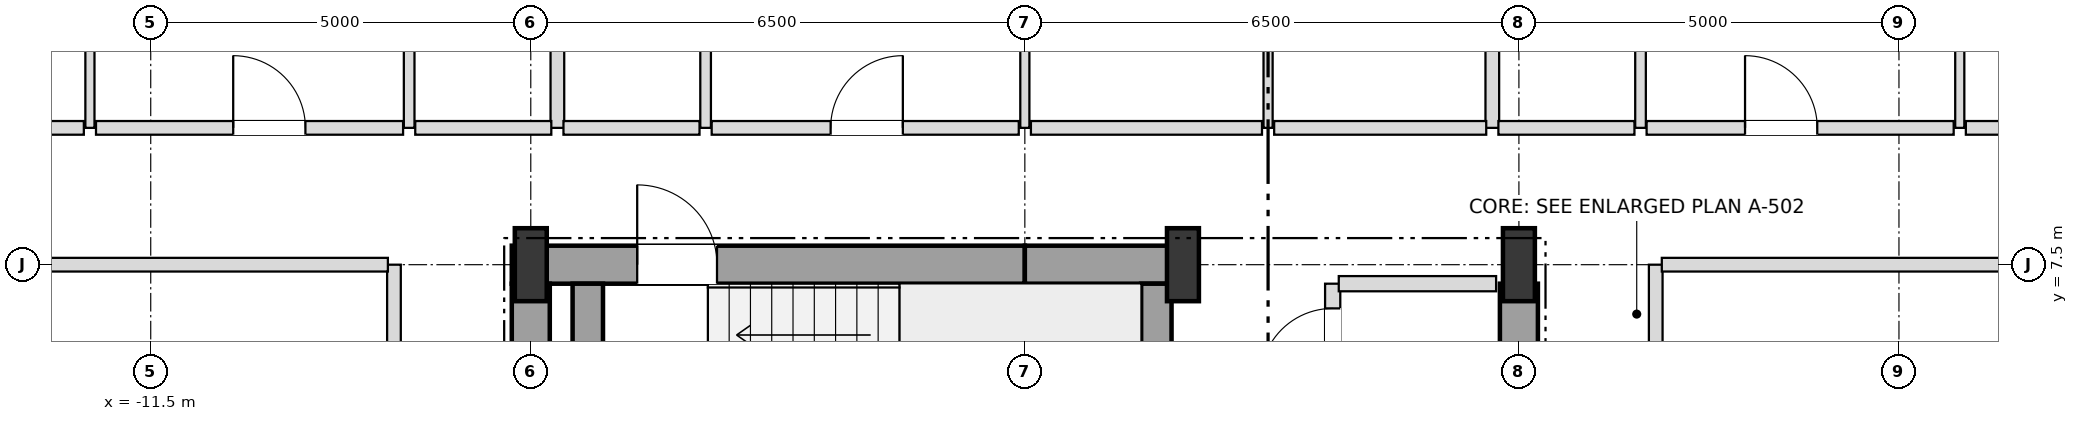
"""IFC4 building model, lengths in metres.
Left out: names, types, materials, properties, quantities, classifications, styles, units other than length and angle.
Written with IfcOpenShell. Run it as: python <this file> out.ifc"""

import sys

from ifc_helpers import new_model, si_unit, direction, frame, frame_2d, origin, origin_2d, place, context, subcontext, project, spatial, rectangle, i_section, extrude, element, fill, save


model = new_model("IFC4")
c1 = context("Model", 3, precision=1e-05, world=origin(), true_north=direction((0.0, 1.0)))
c2 = subcontext(c1, "Body", "Model", "MODEL_VIEW")
j1 = project(units=[si_unit("LENGTHUNIT", "METRE"), si_unit("PLANEANGLEUNIT", "RADIAN")], contexts=[c1])
p1 = place(None, origin())
s1 = spatial("IfcSite", under=j1, at=p1, CompositionType="ELEMENT")
p2 = place(p1, origin())
s2 = spatial("IfcBuilding", under=s1, at=p2, CompositionType="ELEMENT")
p3 = place(p2, frame((0.0, 0.0, 39.6)))
s3 = spatial("IfcBuildingStorey", under=s2, at=p3, CompositionType="ELEMENT", Elevation=39.6)
for number, where, z_axis, x_axis in (
    (1, (-6.5, 7.5, 0.0), (0.0, 0.0, 1.0), (1.0, 0.0, 0.0)),
    (2, (2.08, 7.5, 0.0), (0.0, 0.0, 1.0), (1.0, 0.0, 0.0)),
    (3, (6.5, 7.5, 0.0), (0.0, 0.0, 1.0), (1.0, 0.0, 0.0)),
):
    element("IfcColumn", number, at=place(p3, frame(where, z_axis=z_axis, x_axis=x_axis)), inside=s3, PredefinedType="COLUMN", context=c2, shape_type="SweptSolid", body=[
        extrude(i_section(OverallWidth=0.42, OverallDepth=0.96, WebThickness=0.022, FlangeThickness=0.034, at=origin_2d()), origin(), (0.0, 0.0, 1.0), 3.6),
    ])
p4 = place(p3, frame((-6.75, 7.5, 0.0), z_axis=(0.0, 0.0, 1.0), x_axis=(1.0, 0.0, 0.0)))
e4 = element("IfcWall", 4, at=p4, inside=s3, PredefinedType="SHEAR", context=c2, shape_type="SweptSolid", body=[
    extrude(rectangle(XDim=6.75, YDim=0.5, at=frame_2d((3.375, 0.0))), origin(), (0.0, 0.0, 1.0), 3.38),
])
p5 = place(p4, frame((1.65, 0.0, 0.0)))
e5 = element("IfcOpeningElement", 5, at=p5, cuts=e4, PredefinedType="OPENING", context=c2, shape_type="SweptSolid", body=[
    extrude(rectangle(XDim=1.05, YDim=2.15, at=frame_2d((0.525, 1.075))), frame((0.0, 0.26, 0.0), z_axis=(0.0, -1.0, 0.0), x_axis=(1.0, 0.0, 0.0)), (0.0, 0.0, 1.0), 0.52),
])
p6 = place(p3, frame((0.0, 7.5, 0.0), z_axis=(0.0, 0.0, 1.0), x_axis=(1.0, 0.0, 0.0)))
e6 = element("IfcWall", 6, at=p6, inside=s3, PredefinedType="SHEAR", context=c2, shape_type="SweptSolid", body=[
    extrude(rectangle(XDim=2.08, YDim=0.5, at=frame_2d((1.04, 0.0))), origin(), (0.0, 0.0, 1.0), 3.38),
])
for number, where, z_axis, x_axis in (
    (7, (-6.5, 3.95, 0.0), (0.0, 0.0, 1.0), (0.0, 1.0, 0.0)),
    (8, (6.5, 3.95, 0.0), (0.0, 0.0, 1.0), (0.0, 1.0, 0.0)),
):
    element("IfcWall", number, at=place(p3, frame(where, z_axis=z_axis, x_axis=x_axis)), inside=s3, PredefinedType="SHEAR", context=c2, shape_type="SweptSolid", body=[
        extrude(rectangle(XDim=3.3, YDim=0.5, at=frame_2d((1.65, 0.0))), origin(), (0.0, 0.0, 1.0), 3.38),
    ])
for number, where, z_axis, x_axis in (
    (9, (1.73, 3.95, 0.0), (0.0, 0.0, 1.0), (0.0, 1.0, 0.0)),
    (10, (-5.75, 3.95, 0.0), (0.0, 0.0, 1.0), (0.0, 1.0, 0.0)),
):
    element("IfcWall", number, at=place(p3, frame(where, z_axis=z_axis, x_axis=x_axis)), inside=s3, PredefinedType="SHEAR", context=c2, shape_type="SweptSolid", body=[
        extrude(rectangle(XDim=3.3, YDim=0.4, at=frame_2d((1.65, 0.0))), origin(), (0.0, 0.0, 1.0), 3.38),
    ])
p7 = place(p3, frame((-12.3, 9.3, 0.0), z_axis=(0.0, 0.0, 1.0), x_axis=(0.0, 1.0, 0.0)))
e11 = element("IfcWall", 11, at=p7, inside=s3, PredefinedType="PARTITIONING", context=c2, shape_type="SweptSolid", body=[
    extrude(rectangle(XDim=15.6, YDim=0.12, at=frame_2d((7.8, 0.0))), origin(), (0.0, 0.0, 1.0), 2.736),
])
p8 = place(p7, frame((4.325, 0.0, 0.0)))
e12 = element("IfcOpeningElement", 12, at=p8, cuts=e11, PredefinedType="OPENING", context=c2, shape_type="SweptSolid", body=[
    extrude(rectangle(XDim=0.95, YDim=2.1, at=frame_2d((0.475, 1.05))), frame((0.0, 0.07, 0.0), z_axis=(0.0, -1.0, 0.0), x_axis=(1.0, 0.0, 0.0)), (0.0, 0.0, 1.0), 0.14),
])
p9 = place(p7, frame((12.15, 0.0, 0.0)))
e13 = element("IfcOpeningElement", 13, at=p9, cuts=e11, PredefinedType="OPENING", context=c2, shape_type="SweptSolid", body=[
    extrude(rectangle(XDim=0.9, YDim=2.1, at=frame_2d((0.45, 1.05))), frame((0.0, 0.07, 0.0), z_axis=(0.0, -1.0, 0.0), x_axis=(1.0, 0.0, 0.0)), (0.0, 0.0, 1.0), 0.14),
])
p10 = place(p3, frame((-8.3, -7.5, 0.0), z_axis=(0.0, 0.0, 1.0), x_axis=(0.0, 1.0, 0.0)))
e14 = element("IfcWall", 14, at=p10, inside=s3, PredefinedType="PARTITIONING", context=c2, shape_type="SweptSolid", body=[
    extrude(rectangle(XDim=15.0, YDim=0.18, at=frame_2d((7.5, 0.0))), origin(), (0.0, 0.0, 1.0), 3.38),
])
p11 = place(p10, frame((3.475, 0.0, 0.0)))
e15 = element("IfcOpeningElement", 15, at=p11, cuts=e14, PredefinedType="OPENING", context=c2, shape_type="SweptSolid", body=[
    extrude(rectangle(XDim=0.95, YDim=2.15, at=frame_2d((0.475, 1.075))), frame((0.0, 0.1, 0.0), z_axis=(0.0, -1.0, 0.0), x_axis=(1.0, 0.0, 0.0)), (0.0, 0.0, 1.0), 0.2),
])
p12 = place(p3, frame((-8.1, 9.3, 0.0), z_axis=(0.0, 0.0, 1.0), x_axis=(0.0, 1.0, 0.0)))
e16 = element("IfcWall", 16, at=p12, inside=s3, PredefinedType="PARTITIONING", context=c2, shape_type="SweptSolid", body=[
    extrude(rectangle(XDim=9.6, YDim=0.14, at=frame_2d((4.8, 0.0))), origin(), (0.0, 0.0, 1.0), 2.816),
])
p13 = place(p12, frame((4.35, 0.0, 0.0)))
e17 = element("IfcOpeningElement", 17, at=p13, cuts=e16, PredefinedType="OPENING", context=c2, shape_type="SweptSolid", body=[
    extrude(rectangle(XDim=0.9, YDim=2.1, at=frame_2d((0.45, 1.05))), frame((0.0, 0.08, 0.0), z_axis=(0.0, -1.0, 0.0), x_axis=(1.0, 0.0, 0.0)), (0.0, 0.0, 1.0), 0.16),
])
p14 = place(p3, frame((-6.15, 9.3, 0.0), z_axis=(0.0, 0.0, 1.0), x_axis=(0.0, 1.0, 0.0)))
e18 = element("IfcWall", 18, at=p14, inside=s3, PredefinedType="PARTITIONING", context=c2, shape_type="SweptSolid", body=[
    extrude(rectangle(XDim=15.6, YDim=0.18, at=frame_2d((7.8, 0.0))), origin(), (0.0, 0.0, 1.0), 2.816),
])
p15 = place(p3, frame((-4.2, 9.3, 0.0), z_axis=(0.0, 0.0, 1.0), x_axis=(0.0, 1.0, 0.0)))
e19 = element("IfcWall", 19, at=p15, inside=s3, PredefinedType="PARTITIONING", context=c2, shape_type="SweptSolid", body=[
    extrude(rectangle(XDim=9.6, YDim=0.14, at=frame_2d((4.8, 0.0))), origin(), (0.0, 0.0, 1.0), 2.948),
])
p16 = place(p15, frame((4.35, 0.0, 0.0)))
e20 = element("IfcOpeningElement", 20, at=p16, cuts=e19, PredefinedType="OPENING", context=c2, shape_type="SweptSolid", body=[
    extrude(rectangle(XDim=0.9, YDim=2.1, at=frame_2d((0.45, 1.05))), frame((0.0, 0.08, 0.0), z_axis=(0.0, -1.0, 0.0), x_axis=(1.0, 0.0, 0.0)), (0.0, 0.0, 1.0), 0.16),
])
p17 = place(p3, frame((0.0, 9.3, 0.0), z_axis=(0.0, 0.0, 1.0), x_axis=(0.0, 1.0, 0.0)))
e21 = element("IfcWall", 21, at=p17, inside=s3, PredefinedType="PARTITIONING", context=c2, shape_type="SweptSolid", body=[
    extrude(rectangle(XDim=15.6, YDim=0.12, at=frame_2d((7.8, 0.0))), origin(), (0.0, 0.0, 1.0), 2.816),
])
p18 = place(p17, frame((4.325, 0.0, 0.0)))
e22 = element("IfcOpeningElement", 22, at=p18, cuts=e21, PredefinedType="OPENING", context=c2, shape_type="SweptSolid", body=[
    extrude(rectangle(XDim=0.95, YDim=2.1, at=frame_2d((0.475, 1.05))), frame((0.0, 0.07, 0.0), z_axis=(0.0, -1.0, 0.0), x_axis=(1.0, 0.0, 0.0)), (0.0, 0.0, 1.0), 0.14),
])
p19 = place(p17, frame((12.15, 0.0, 0.0)))
e23 = element("IfcOpeningElement", 23, at=p19, cuts=e21, PredefinedType="OPENING", context=c2, shape_type="SweptSolid", body=[
    extrude(rectangle(XDim=0.9, YDim=2.1, at=frame_2d((0.45, 1.05))), frame((0.0, 0.07, 0.0), z_axis=(0.0, -1.0, 0.0), x_axis=(1.0, 0.0, 0.0)), (0.0, 0.0, 1.0), 0.14),
])
p20 = place(p3, frame((3.2, 9.3, 0.0), z_axis=(0.0, 0.0, 1.0), x_axis=(0.0, 1.0, 0.0)))
e24 = element("IfcWall", 24, at=p20, inside=s3, PredefinedType="PARTITIONING", context=c2, shape_type="SweptSolid", body=[
    extrude(rectangle(XDim=15.6, YDim=0.12, at=frame_2d((7.8, 0.0))), origin(), (0.0, 0.0, 1.0), 2.816),
])
p21 = place(p20, frame((4.35, 0.0, 0.0)))
e25 = element("IfcOpeningElement", 25, at=p21, cuts=e24, PredefinedType="OPENING", context=c2, shape_type="SweptSolid", body=[
    extrude(rectangle(XDim=0.9, YDim=2.1, at=frame_2d((0.45, 1.05))), frame((0.0, 0.07, 0.0), z_axis=(0.0, -1.0, 0.0), x_axis=(1.0, 0.0, 0.0)), (0.0, 0.0, 1.0), 0.14),
])
p22 = place(p20, frame((12.15, 0.0, 0.0)))
e26 = element("IfcOpeningElement", 26, at=p22, cuts=e24, PredefinedType="OPENING", context=c2, shape_type="SweptSolid", body=[
    extrude(rectangle(XDim=0.9, YDim=2.1, at=frame_2d((0.45, 1.05))), frame((0.0, 0.07, 0.0), z_axis=(0.0, -1.0, 0.0), x_axis=(1.0, 0.0, 0.0)), (0.0, 0.0, 1.0), 0.14),
])
p23 = place(p3, frame((4.05, 4.2, 0.0), z_axis=(0.0, 0.0, 1.0), x_axis=(0.0, 1.0, 0.0)))
e27 = element("IfcWall", 27, at=p23, inside=s3, PredefinedType="SOLIDWALL", context=c2, shape_type="SweptSolid", body=[
    extrude(rectangle(XDim=3.05, YDim=0.2, at=frame_2d((1.525, 0.0))), origin(), (0.0, 0.0, 1.0), 3.38),
])
p24 = place(p23, frame((0.275, 0.0, 0.0)))
e28 = element("IfcOpeningElement", 28, at=p24, cuts=e27, PredefinedType="OPENING", context=c2, shape_type="SweptSolid", body=[
    extrude(rectangle(XDim=0.95, YDim=2.15, at=frame_2d((0.475, 1.075))), frame((0.0, 0.11, 0.0), z_axis=(0.0, -1.0, 0.0), x_axis=(1.0, 0.0, 0.0)), (0.0, 0.0, 1.0), 0.22),
])
p25 = place(p23, frame((1.775, 0.0, 0.0)))
e29 = element("IfcOpeningElement", 29, at=p25, cuts=e27, PredefinedType="OPENING", context=c2, shape_type="SweptSolid", body=[
    extrude(rectangle(XDim=0.95, YDim=2.15, at=frame_2d((0.475, 1.075))), frame((0.0, 0.11, 0.0), z_axis=(0.0, -1.0, 0.0), x_axis=(1.0, 0.0, 0.0)), (0.0, 0.0, 1.0), 0.22),
])
p26 = place(p3, frame((6.15, 9.3, 0.0), z_axis=(0.0, 0.0, 1.0), x_axis=(0.0, 1.0, 0.0)))
e30 = element("IfcWall", 30, at=p26, inside=s3, PredefinedType="PARTITIONING", context=c2, shape_type="SweptSolid", body=[
    extrude(rectangle(XDim=15.6, YDim=0.18, at=frame_2d((7.8, 0.0))), origin(), (0.0, 0.0, 1.0), 2.816),
])
p27 = place(p3, frame((8.1, 9.3, 0.0), z_axis=(0.0, 0.0, 1.0), x_axis=(0.0, 1.0, 0.0)))
e31 = element("IfcWall", 31, at=p27, inside=s3, PredefinedType="PARTITIONING", context=c2, shape_type="SweptSolid", body=[
    extrude(rectangle(XDim=9.6, YDim=0.14, at=frame_2d((4.8, 0.0))), origin(), (0.0, 0.0, 1.0), 2.816),
])
p28 = place(p27, frame((4.35, 0.0, 0.0)))
e32 = element("IfcOpeningElement", 32, at=p28, cuts=e31, PredefinedType="OPENING", context=c2, shape_type="SweptSolid", body=[
    extrude(rectangle(XDim=0.9, YDim=2.1, at=frame_2d((0.45, 1.05))), frame((0.0, 0.08, 0.0), z_axis=(0.0, -1.0, 0.0), x_axis=(1.0, 0.0, 0.0)), (0.0, 0.0, 1.0), 0.16),
])
p29 = place(p3, frame((8.3, -7.5, 0.0), z_axis=(0.0, 0.0, 1.0), x_axis=(0.0, 1.0, 0.0)))
e33 = element("IfcWall", 33, at=p29, inside=s3, PredefinedType="PARTITIONING", context=c2, shape_type="SweptSolid", body=[
    extrude(rectangle(XDim=15.0, YDim=0.18, at=frame_2d((7.5, 0.0))), origin(), (0.0, 0.0, 1.0), 3.38),
])
p30 = place(p29, frame((3.475, 0.0, 0.0)))
e34 = element("IfcOpeningElement", 34, at=p30, cuts=e33, PredefinedType="OPENING", context=c2, shape_type="SweptSolid", body=[
    extrude(rectangle(XDim=0.95, YDim=2.15, at=frame_2d((0.475, 1.075))), frame((0.0, 0.1, 0.0), z_axis=(0.0, -1.0, 0.0), x_axis=(1.0, 0.0, 0.0)), (0.0, 0.0, 1.0), 0.2),
])
p31 = place(p3, frame((12.3, 9.3, 0.0), z_axis=(0.0, 0.0, 1.0), x_axis=(0.0, 1.0, 0.0)))
e35 = element("IfcWall", 35, at=p31, inside=s3, PredefinedType="PARTITIONING", context=c2, shape_type="SweptSolid", body=[
    extrude(rectangle(XDim=15.6, YDim=0.12, at=frame_2d((7.8, 0.0))), origin(), (0.0, 0.0, 1.0), 2.736),
])
p32 = place(p31, frame((4.325, 0.0, 0.0)))
e36 = element("IfcOpeningElement", 36, at=p32, cuts=e35, PredefinedType="OPENING", context=c2, shape_type="SweptSolid", body=[
    extrude(rectangle(XDim=0.95, YDim=2.1, at=frame_2d((0.475, 1.05))), frame((0.0, 0.07, 0.0), z_axis=(0.0, -1.0, 0.0), x_axis=(1.0, 0.0, 0.0)), (0.0, 0.0, 1.0), 0.14),
])
p33 = place(p31, frame((12.15, 0.0, 0.0)))
e37 = element("IfcOpeningElement", 37, at=p33, cuts=e35, PredefinedType="OPENING", context=c2, shape_type="SweptSolid", body=[
    extrude(rectangle(XDim=0.9, YDim=2.1, at=frame_2d((0.45, 1.05))), frame((0.0, 0.07, 0.0), z_axis=(0.0, -1.0, 0.0), x_axis=(1.0, 0.0, 0.0)), (0.0, 0.0, 1.0), 0.14),
])
p34 = place(p3, frame((4.13, 7.25, 0.0), z_axis=(0.0, 0.0, 1.0), x_axis=(1.0, 0.0, 0.0)))
e38 = element("IfcWall", 38, at=p34, inside=s3, PredefinedType="SOLIDWALL", context=c2, shape_type="SweptSolid", body=[
    extrude(rectangle(XDim=2.07, YDim=0.2, at=frame_2d((1.035, 0.0))), origin(), (0.0, 0.0, 1.0), 3.38),
])
for number, where, z_axis, x_axis in (
    (39, (-16.02, 7.5, 0.0), (0.0, 0.0, 1.0), (1.0, 0.0, 0.0)),
    (40, (8.38, 7.5, 0.0), (0.0, 0.0, 1.0), (1.0, 0.0, 0.0)),
):
    element("IfcWall", number, at=place(p3, frame(where, z_axis=z_axis, x_axis=x_axis)), inside=s3, PredefinedType="PARTITIONING", context=c2, shape_type="SweptSolid", body=[
        extrude(rectangle(XDim=7.64, YDim=0.18, at=frame_2d((3.82, 0.0))), origin(), (0.0, 0.0, 1.0), 2.816),
    ])
p35 = place(p3, frame((-15.37, 9.3, 0.0), z_axis=(0.0, 0.0, 1.0), x_axis=(1.0, 0.0, 0.0)))
e41 = element("IfcWall", 41, at=p35, inside=s3, PredefinedType="PARTITIONING", context=c2, shape_type="SweptSolid", body=[
    extrude(rectangle(XDim=2.99, YDim=0.18, at=frame_2d((1.495, 0.0))), origin(), (0.0, 0.0, 1.0), 3.38),
])
p36 = place(p3, frame((-12.22, 9.3, 0.0), z_axis=(0.0, 0.0, 1.0), x_axis=(1.0, 0.0, 0.0)))
e42 = element("IfcWall", 42, at=p36, inside=s3, PredefinedType="PARTITIONING", context=c2, shape_type="SweptSolid", body=[
    extrude(rectangle(XDim=4.04, YDim=0.18, at=frame_2d((2.02, 0.0))), origin(), (0.0, 0.0, 1.0), 3.38),
])
p37 = place(p36, frame((1.805, 0.0, 0.0)))
e43 = element("IfcOpeningElement", 43, at=p37, cuts=e42, PredefinedType="OPENING", context=c2, shape_type="SweptSolid", body=[
    extrude(rectangle(XDim=0.95, YDim=2.15, at=frame_2d((0.475, 1.075))), frame((0.0, 0.1, 0.0), z_axis=(0.0, -1.0, 0.0), x_axis=(1.0, 0.0, 0.0)), (0.0, 0.0, 1.0), 0.2),
])
p38 = place(p3, frame((-8.02, 9.3, 0.0), z_axis=(0.0, 0.0, 1.0), x_axis=(1.0, 0.0, 0.0)))
e44 = element("IfcWall", 44, at=p38, inside=s3, PredefinedType="PARTITIONING", context=c2, shape_type="SweptSolid", body=[
    extrude(rectangle(XDim=1.79, YDim=0.18, at=frame_2d((0.895, 0.0))), origin(), (0.0, 0.0, 1.0), 2.816),
])
p39 = place(p3, frame((-6.07, 9.3, 0.0), z_axis=(0.0, 0.0, 1.0), x_axis=(1.0, 0.0, 0.0)))
e45 = element("IfcWall", 45, at=p39, inside=s3, PredefinedType="PARTITIONING", context=c2, shape_type="SweptSolid", body=[
    extrude(rectangle(XDim=1.79, YDim=0.18, at=frame_2d((0.895, 0.0))), origin(), (0.0, 0.0, 1.0), 3.38),
])
p40 = place(p3, frame((-4.12, 9.3, 0.0), z_axis=(0.0, 0.0, 1.0), x_axis=(1.0, 0.0, 0.0)))
e46 = element("IfcWall", 46, at=p40, inside=s3, PredefinedType="PARTITIONING", context=c2, shape_type="SweptSolid", body=[
    extrude(rectangle(XDim=4.04, YDim=0.18, at=frame_2d((2.02, 0.0))), origin(), (0.0, 0.0, 1.0), 3.38),
])
p41 = place(p40, frame((1.565, 0.0, 0.0)))
e47 = element("IfcOpeningElement", 47, at=p41, cuts=e46, PredefinedType="OPENING", context=c2, shape_type="SweptSolid", body=[
    extrude(rectangle(XDim=0.95, YDim=2.15, at=frame_2d((0.475, 1.075))), frame((0.0, 0.1, 0.0), z_axis=(0.0, -1.0, 0.0), x_axis=(1.0, 0.0, 0.0)), (0.0, 0.0, 1.0), 0.2),
])
p42 = place(p3, frame((0.08, 9.3, 0.0), z_axis=(0.0, 0.0, 1.0), x_axis=(1.0, 0.0, 0.0)))
e48 = element("IfcWall", 48, at=p42, inside=s3, PredefinedType="PARTITIONING", context=c2, shape_type="SweptSolid", body=[
    extrude(rectangle(XDim=3.04, YDim=0.18, at=frame_2d((1.52, 0.0))), origin(), (0.0, 0.0, 1.0), 3.38),
])
p43 = place(p3, frame((3.28, 9.3, 0.0), z_axis=(0.0, 0.0, 1.0), x_axis=(1.0, 0.0, 0.0)))
e49 = element("IfcWall", 49, at=p43, inside=s3, PredefinedType="PARTITIONING", context=c2, shape_type="SweptSolid", body=[
    extrude(rectangle(XDim=2.79, YDim=0.18, at=frame_2d((1.395, 0.0))), origin(), (0.0, 0.0, 1.0), 3.38),
])
p44 = place(p3, frame((6.23, 9.3, 0.0), z_axis=(0.0, 0.0, 1.0), x_axis=(1.0, 0.0, 0.0)))
e50 = element("IfcWall", 50, at=p44, inside=s3, PredefinedType="PARTITIONING", context=c2, shape_type="SweptSolid", body=[
    extrude(rectangle(XDim=1.79, YDim=0.18, at=frame_2d((0.895, 0.0))), origin(), (0.0, 0.0, 1.0), 2.816),
])
p45 = place(p3, frame((8.18, 9.3, 0.0), z_axis=(0.0, 0.0, 1.0), x_axis=(1.0, 0.0, 0.0)))
e51 = element("IfcWall", 51, at=p45, inside=s3, PredefinedType="PARTITIONING", context=c2, shape_type="SweptSolid", body=[
    extrude(rectangle(XDim=4.04, YDim=0.18, at=frame_2d((2.02, 0.0))), origin(), (0.0, 0.0, 1.0), 3.38),
])
p46 = place(p45, frame((1.295, 0.0, 0.0)))
e52 = element("IfcOpeningElement", 52, at=p46, cuts=e51, PredefinedType="OPENING", context=c2, shape_type="SweptSolid", body=[
    extrude(rectangle(XDim=0.95, YDim=2.15, at=frame_2d((0.475, 1.075))), frame((0.0, 0.1, 0.0), z_axis=(0.0, -1.0, 0.0), x_axis=(1.0, 0.0, 0.0)), (0.0, 0.0, 1.0), 0.2),
])
p47 = place(p3, frame((12.38, 9.3, 0.0), z_axis=(0.0, 0.0, 1.0), x_axis=(1.0, 0.0, 0.0)))
e53 = element("IfcWall", 53, at=p47, inside=s3, PredefinedType="PARTITIONING", context=c2, shape_type="SweptSolid", body=[
    extrude(rectangle(XDim=3.04, YDim=0.18, at=frame_2d((1.52, 0.0))), origin(), (0.0, 0.0, 1.0), 3.38),
])
p48 = place(p5, origin())
e54 = element("IfcDoor", 54, at=p48, inside=s3, OperationType="SINGLE_SWING_LEFT", PredefinedType="DOOR", context=c2, shape_type="SweptSolid", body=[
    extrude(rectangle(XDim=1.05, YDim=2.15, at=frame_2d((0.525, 1.075))), frame((0.0, 0.025, 0.0), z_axis=(0.0, -1.0, 0.0), x_axis=(1.0, 0.0, 0.0)), (0.0, 0.0, 1.0), 0.05),
])
fill(e5, e54)
p49 = place(p25, origin())
e55 = element("IfcDoor", 55, at=p49, inside=s3, OperationType="SINGLE_SWING_LEFT", PredefinedType="DOOR", context=c2, shape_type="SweptSolid", body=[
    extrude(rectangle(XDim=0.95, YDim=2.15, at=frame_2d((0.475, 1.075))), frame((0.0, 0.025, 0.0), z_axis=(0.0, -1.0, 0.0), x_axis=(1.0, 0.0, 0.0)), (0.0, 0.0, 1.0), 0.05),
])
fill(e29, e55)
p50 = place(p37, origin())
e56 = element("IfcDoor", 56, at=p50, inside=s3, OperationType="SINGLE_SWING_LEFT", PredefinedType="DOOR", context=c2, shape_type="SweptSolid", body=[
    extrude(rectangle(XDim=0.95, YDim=2.15, at=frame_2d((0.475, 1.075))), frame((0.0, 0.025, 0.0), z_axis=(0.0, -1.0, 0.0), x_axis=(1.0, 0.0, 0.0)), (0.0, 0.0, 1.0), 0.05),
])
fill(e43, e56)
p51 = place(p41, origin())
e57 = element("IfcDoor", 57, at=p51, inside=s3, OperationType="SINGLE_SWING_RIGHT", PredefinedType="DOOR", context=c2, shape_type="SweptSolid", body=[
    extrude(rectangle(XDim=0.95, YDim=2.15, at=frame_2d((0.475, 1.075))), frame((0.0, 0.025, 0.0), z_axis=(0.0, -1.0, 0.0), x_axis=(1.0, 0.0, 0.0)), (0.0, 0.0, 1.0), 0.05),
])
fill(e47, e57)
p52 = place(p46, origin())
e58 = element("IfcDoor", 58, at=p52, inside=s3, OperationType="SINGLE_SWING_LEFT", PredefinedType="DOOR", context=c2, shape_type="SweptSolid", body=[
    extrude(rectangle(XDim=0.95, YDim=2.15, at=frame_2d((0.475, 1.075))), frame((0.0, 0.025, 0.0), z_axis=(0.0, -1.0, 0.0), x_axis=(1.0, 0.0, 0.0)), (0.0, 0.0, 1.0), 0.05),
])
fill(e52, e58)
save(model, sys.argv[1])
